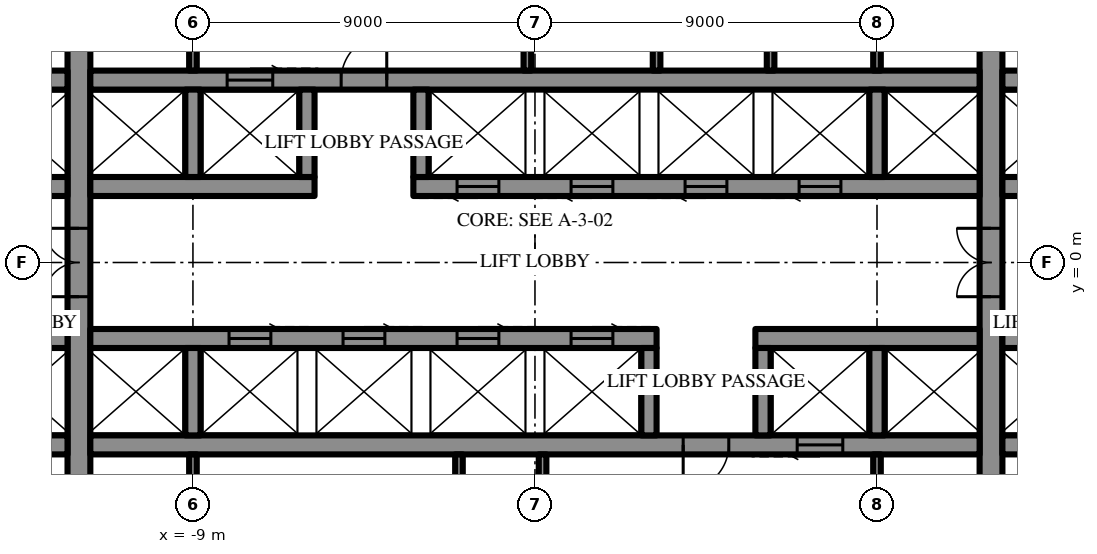
"""IFC4 building model, lengths in metres.
Left out: names, types, materials, properties, quantities, classifications, styles, units other than length and angle.
Written with IfcOpenShell. Run it as: python <this file> out.ifc"""

import sys

from ifc_helpers import new_model, si_unit, direction, frame, frame_2d, origin, place, context, subcontext, project, spatial, rectangle, extrude, element, fill, save


model = new_model("IFC4")
c1 = context("Model", 3, precision=1e-05, world=origin(), true_north=direction((0.0, 1.0)))
c2 = subcontext(c1, "Body", "Model", "MODEL_VIEW")
j1 = project(units=[si_unit("LENGTHUNIT", "METRE"), si_unit("PLANEANGLEUNIT", "RADIAN")], contexts=[c1])
p1 = place(None, origin())
s1 = spatial("IfcSite", under=j1, at=p1, CompositionType="ELEMENT")
p2 = place(p1, origin())
s2 = spatial("IfcBuilding", under=s1, at=p2, CompositionType="ELEMENT")
p3 = place(p2, frame((0.0, 0.0, 157.3)))
s3 = spatial("IfcBuildingStorey", under=s2, at=p3, CompositionType="ELEMENT", Elevation=157.3)
p4 = place(p3, frame((12.0, -10.7, 0.0), z_axis=(0.0, 0.0, 1.0), x_axis=(0.0, 1.0, 0.0)))
e1 = element("IfcWall", 1, at=p4, inside=s3, PredefinedType="SHEAR", context=c2, shape_type="SweptSolid", body=[
    extrude(rectangle(XDim=21.4, YDim=0.6, at=frame_2d((10.7, 0.0))), origin(), (0.0, 0.0, 1.0), 4.2),
])
p5 = place(p4, frame((9.8, 0.0, 0.0)))
e2 = element("IfcOpeningElement", 2, at=p5, cuts=e1, PredefinedType="OPENING", context=c2, shape_type="SweptSolid", body=[
    extrude(rectangle(XDim=1.8, YDim=2.4, at=frame_2d((0.9, 1.2))), frame((0.0, 0.31, 0.0), z_axis=(0.0, -1.0, 0.0), x_axis=(1.0, 0.0, 0.0)), (0.0, 0.0, 1.0), 0.62),
])
p6 = place(p3, frame((-12.0, -10.7, 0.0), z_axis=(0.0, 0.0, 1.0), x_axis=(0.0, 1.0, 0.0)))
e3 = element("IfcWall", 3, at=p6, inside=s3, PredefinedType="SHEAR", context=c2, shape_type="SweptSolid", body=[
    extrude(rectangle(XDim=21.4, YDim=0.6, at=frame_2d((10.7, 0.0))), origin(), (0.0, 0.0, 1.0), 4.2),
])
p7 = place(p6, frame((9.8, 0.0, 0.0)))
e4 = element("IfcOpeningElement", 4, at=p7, cuts=e3, PredefinedType="OPENING", context=c2, shape_type="SweptSolid", body=[
    extrude(rectangle(XDim=1.8, YDim=2.4, at=frame_2d((0.9, 1.2))), frame((0.0, 0.31, 0.0), z_axis=(0.0, -1.0, 0.0), x_axis=(1.0, 0.0, 0.0)), (0.0, 0.0, 1.0), 0.62),
])
p8 = place(p3, frame((-14.7, 2.0, 0.0), z_axis=(0.0, 0.0, 1.0), x_axis=(1.0, 0.0, 0.0)))
e5 = element("IfcWall", 5, at=p8, inside=s3, PredefinedType="SHEAR", context=c2, shape_type="SweptSolid", body=[
    extrude(rectangle(XDim=2.4, YDim=0.5, at=frame_2d((1.2, 0.0))), origin(), (0.0, 0.0, 1.0), 4.2),
])
p9 = place(p3, frame((-11.7, 2.0, 0.0), z_axis=(0.0, 0.0, 1.0), x_axis=(1.0, 0.0, 0.0)))
e6 = element("IfcWall", 6, at=p9, inside=s3, PredefinedType="SHEAR", context=c2, shape_type="SweptSolid", body=[
    extrude(rectangle(XDim=5.9, YDim=0.5, at=frame_2d((2.95, 0.0))), origin(), (0.0, 0.0, 1.0), 4.2),
])
p10 = place(p3, frame((-3.2, 2.0, 0.0), z_axis=(0.0, 0.0, 1.0), x_axis=(1.0, 0.0, 0.0)))
e7 = element("IfcWall", 7, at=p10, inside=s3, PredefinedType="SHEAR", context=c2, shape_type="SweptSolid", body=[
    extrude(rectangle(XDim=14.9, YDim=0.5, at=frame_2d((7.45, 0.0))), origin(), (0.0, 0.0, 1.0), 4.2),
])
p11 = place(p10, frame((1.15, 0.0, 0.0)))
e8 = element("IfcOpeningElement", 8, at=p11, cuts=e7, PredefinedType="OPENING", context=c2, shape_type="SweptSolid", body=[
    extrude(rectangle(XDim=1.1, YDim=2.2, at=frame_2d((0.55, 1.1))), frame((0.0, 0.26, 0.0), z_axis=(0.0, -1.0, 0.0), x_axis=(1.0, 0.0, 0.0)), (0.0, 0.0, 1.0), 0.52),
])
p12 = place(p10, frame((4.15, 0.0, 0.0)))
e9 = element("IfcOpeningElement", 9, at=p12, cuts=e7, PredefinedType="OPENING", context=c2, shape_type="SweptSolid", body=[
    extrude(rectangle(XDim=1.1, YDim=2.2, at=frame_2d((0.55, 1.1))), frame((0.0, 0.26, 0.0), z_axis=(0.0, -1.0, 0.0), x_axis=(1.0, 0.0, 0.0)), (0.0, 0.0, 1.0), 0.52),
])
p13 = place(p10, frame((7.15, 0.0, 0.0)))
e10 = element("IfcOpeningElement", 10, at=p13, cuts=e7, PredefinedType="OPENING", context=c2, shape_type="SweptSolid", body=[
    extrude(rectangle(XDim=1.1, YDim=2.2, at=frame_2d((0.55, 1.1))), frame((0.0, 0.26, 0.0), z_axis=(0.0, -1.0, 0.0), x_axis=(1.0, 0.0, 0.0)), (0.0, 0.0, 1.0), 0.52),
])
p14 = place(p10, frame((10.15, 0.0, 0.0)))
e11 = element("IfcOpeningElement", 11, at=p14, cuts=e7, PredefinedType="OPENING", context=c2, shape_type="SweptSolid", body=[
    extrude(rectangle(XDim=1.1, YDim=2.2, at=frame_2d((0.55, 1.1))), frame((0.0, 0.26, 0.0), z_axis=(0.0, -1.0, 0.0), x_axis=(1.0, 0.0, 0.0)), (0.0, 0.0, 1.0), 0.52),
])
for number, where, z_axis, x_axis in (
    (12, (12.3, 2.0, 0.0), (0.0, 0.0, 1.0), (1.0, 0.0, 0.0)),
    (13, (-14.7, 4.8, 0.0), (0.0, 0.0, 1.0), (1.0, 0.0, 0.0)),
):
    element("IfcWall", number, at=place(p3, frame(where, z_axis=z_axis, x_axis=x_axis)), inside=s3, PredefinedType="SHEAR", context=c2, shape_type="SweptSolid", body=[
        extrude(rectangle(XDim=2.4, YDim=0.5, at=frame_2d((1.2, 0.0))), origin(), (0.0, 0.0, 1.0), 4.2),
    ])
p15 = place(p3, frame((-11.7, 4.8, 0.0), z_axis=(0.0, 0.0, 1.0), x_axis=(1.0, 0.0, 0.0)))
e14 = element("IfcWall", 14, at=p15, inside=s3, PredefinedType="SHEAR", context=c2, shape_type="SweptSolid", body=[
    extrude(rectangle(XDim=23.4, YDim=0.5, at=frame_2d((11.7, 0.0))), origin(), (0.0, 0.0, 1.0), 4.2),
])
p16 = place(p15, frame((6.6, 0.0, 0.0)))
e15 = element("IfcOpeningElement", 15, at=p16, cuts=e14, PredefinedType="OPENING", context=c2, shape_type="SweptSolid", body=[
    extrude(rectangle(XDim=1.2, YDim=2.2, at=frame_2d((0.6, 1.1))), frame((0.0, 0.26, 0.0), z_axis=(0.0, -1.0, 0.0), x_axis=(1.0, 0.0, 0.0)), (0.0, 0.0, 1.0), 0.52),
])
p17 = place(p15, frame((3.6, 0.0, 0.0)))
e16 = element("IfcOpeningElement", 16, at=p17, cuts=e14, PredefinedType="OPENING", context=c2, shape_type="SweptSolid", body=[
    extrude(rectangle(XDim=1.2, YDim=2.2, at=frame_2d((0.6, 1.1))), frame((0.0, 0.26, 0.0), z_axis=(0.0, -1.0, 0.0), x_axis=(1.0, 0.0, 0.0)), (0.0, 0.0, 1.0), 0.52),
])
p18 = place(p3, frame((12.3, 4.8, 0.0), z_axis=(0.0, 0.0, 1.0), x_axis=(1.0, 0.0, 0.0)))
e17 = element("IfcWall", 17, at=p18, inside=s3, PredefinedType="SHEAR", context=c2, shape_type="SweptSolid", body=[
    extrude(rectangle(XDim=2.4, YDim=0.5, at=frame_2d((1.2, 0.0))), origin(), (0.0, 0.0, 1.0), 4.2),
])
for number, where, z_axis, x_axis in (
    (18, (-9.0, 2.25, 0.0), (0.0, 0.0, 1.0), (0.0, 1.0, 0.0)),
    (19, (-6.0, 2.25, 0.0), (0.0, 0.0, 1.0), (0.0, 1.0, 0.0)),
    (20, (-3.0, 2.25, 0.0), (0.0, 0.0, 1.0), (0.0, 1.0, 0.0)),
    (21, (9.0, 2.25, 0.0), (0.0, 0.0, 1.0), (0.0, 1.0, 0.0)),
):
    element("IfcWall", number, at=place(p3, frame(where, z_axis=z_axis, x_axis=x_axis)), inside=s3, PredefinedType="SHEAR", context=c2, shape_type="SweptSolid", body=[
        extrude(rectangle(XDim=2.3, YDim=0.4, at=frame_2d((1.15, 0.0))), origin(), (0.0, 0.0, 1.0), 4.2),
    ])
p19 = place(p3, frame((-0.2, 5.05, 0.0), z_axis=(0.0, 0.0, 1.0), x_axis=(0.0, 1.0, 0.0)))
e22 = element("IfcWall", 22, at=p19, inside=s3, PredefinedType="SHEAR", context=c2, shape_type="SweptSolid", body=[
    extrude(rectangle(XDim=5.65, YDim=0.2, at=frame_2d((2.825, 0.0))), origin(), (0.0, 0.0, 1.0), 4.2),
])
p20 = place(p3, frame((14.7, -2.0, 0.0), z_axis=(0.0, 0.0, 1.0), x_axis=(-1.0, 0.0, 0.0)))
e23 = element("IfcWall", 23, at=p20, inside=s3, PredefinedType="SHEAR", context=c2, shape_type="SweptSolid", body=[
    extrude(rectangle(XDim=2.4, YDim=0.5, at=frame_2d((1.2, 0.0))), origin(), (0.0, 0.0, 1.0), 4.2),
])
p21 = place(p3, frame((11.7, -2.0, 0.0), z_axis=(0.0, 0.0, 1.0), x_axis=(-1.0, 0.0, 0.0)))
e24 = element("IfcWall", 24, at=p21, inside=s3, PredefinedType="SHEAR", context=c2, shape_type="SweptSolid", body=[
    extrude(rectangle(XDim=5.9, YDim=0.5, at=frame_2d((2.95, 0.0))), origin(), (0.0, 0.0, 1.0), 4.2),
])
p22 = place(p3, frame((3.2, -2.0, 0.0), z_axis=(0.0, 0.0, 1.0), x_axis=(-1.0, 0.0, 0.0)))
e25 = element("IfcWall", 25, at=p22, inside=s3, PredefinedType="SHEAR", context=c2, shape_type="SweptSolid", body=[
    extrude(rectangle(XDim=14.9, YDim=0.5, at=frame_2d((7.45, 0.0))), origin(), (0.0, 0.0, 1.0), 4.2),
])
p23 = place(p22, frame((1.15, 0.0, 0.0)))
e26 = element("IfcOpeningElement", 26, at=p23, cuts=e25, PredefinedType="OPENING", context=c2, shape_type="SweptSolid", body=[
    extrude(rectangle(XDim=1.1, YDim=2.2, at=frame_2d((0.55, 1.1))), frame((0.0, 0.26, 0.0), z_axis=(0.0, -1.0, 0.0), x_axis=(1.0, 0.0, 0.0)), (0.0, 0.0, 1.0), 0.52),
])
p24 = place(p22, frame((4.15, 0.0, 0.0)))
e27 = element("IfcOpeningElement", 27, at=p24, cuts=e25, PredefinedType="OPENING", context=c2, shape_type="SweptSolid", body=[
    extrude(rectangle(XDim=1.1, YDim=2.2, at=frame_2d((0.55, 1.1))), frame((0.0, 0.26, 0.0), z_axis=(0.0, -1.0, 0.0), x_axis=(1.0, 0.0, 0.0)), (0.0, 0.0, 1.0), 0.52),
])
p25 = place(p22, frame((7.15, 0.0, 0.0)))
e28 = element("IfcOpeningElement", 28, at=p25, cuts=e25, PredefinedType="OPENING", context=c2, shape_type="SweptSolid", body=[
    extrude(rectangle(XDim=1.1, YDim=2.2, at=frame_2d((0.55, 1.1))), frame((0.0, 0.26, 0.0), z_axis=(0.0, -1.0, 0.0), x_axis=(1.0, 0.0, 0.0)), (0.0, 0.0, 1.0), 0.52),
])
p26 = place(p22, frame((10.15, 0.0, 0.0)))
e29 = element("IfcOpeningElement", 29, at=p26, cuts=e25, PredefinedType="OPENING", context=c2, shape_type="SweptSolid", body=[
    extrude(rectangle(XDim=1.1, YDim=2.2, at=frame_2d((0.55, 1.1))), frame((0.0, 0.26, 0.0), z_axis=(0.0, -1.0, 0.0), x_axis=(1.0, 0.0, 0.0)), (0.0, 0.0, 1.0), 0.52),
])
for number, where, z_axis, x_axis in (
    (30, (-12.3, -2.0, 0.0), (0.0, 0.0, 1.0), (-1.0, 0.0, 0.0)),
    (31, (14.7, -4.8, 0.0), (0.0, 0.0, 1.0), (-1.0, 0.0, 0.0)),
):
    element("IfcWall", number, at=place(p3, frame(where, z_axis=z_axis, x_axis=x_axis)), inside=s3, PredefinedType="SHEAR", context=c2, shape_type="SweptSolid", body=[
        extrude(rectangle(XDim=2.4, YDim=0.5, at=frame_2d((1.2, 0.0))), origin(), (0.0, 0.0, 1.0), 4.2),
    ])
p27 = place(p3, frame((11.7, -4.8, 0.0), z_axis=(0.0, 0.0, 1.0), x_axis=(-1.0, 0.0, 0.0)))
e32 = element("IfcWall", 32, at=p27, inside=s3, PredefinedType="SHEAR", context=c2, shape_type="SweptSolid", body=[
    extrude(rectangle(XDim=23.4, YDim=0.5, at=frame_2d((11.7, 0.0))), origin(), (0.0, 0.0, 1.0), 4.2),
])
p28 = place(p27, frame((6.6, 0.0, 0.0)))
e33 = element("IfcOpeningElement", 33, at=p28, cuts=e32, PredefinedType="OPENING", context=c2, shape_type="SweptSolid", body=[
    extrude(rectangle(XDim=1.2, YDim=2.2, at=frame_2d((0.6, 1.1))), frame((0.0, 0.26, 0.0), z_axis=(0.0, -1.0, 0.0), x_axis=(1.0, 0.0, 0.0)), (0.0, 0.0, 1.0), 0.52),
])
p29 = place(p27, frame((3.6, 0.0, 0.0)))
e34 = element("IfcOpeningElement", 34, at=p29, cuts=e32, PredefinedType="OPENING", context=c2, shape_type="SweptSolid", body=[
    extrude(rectangle(XDim=1.2, YDim=2.2, at=frame_2d((0.6, 1.1))), frame((0.0, 0.26, 0.0), z_axis=(0.0, -1.0, 0.0), x_axis=(1.0, 0.0, 0.0)), (0.0, 0.0, 1.0), 0.52),
])
p30 = place(p3, frame((-12.3, -4.8, 0.0), z_axis=(0.0, 0.0, 1.0), x_axis=(-1.0, 0.0, 0.0)))
e35 = element("IfcWall", 35, at=p30, inside=s3, PredefinedType="SHEAR", context=c2, shape_type="SweptSolid", body=[
    extrude(rectangle(XDim=2.4, YDim=0.5, at=frame_2d((1.2, 0.0))), origin(), (0.0, 0.0, 1.0), 4.2),
])
for number, where, z_axis, x_axis in (
    (36, (9.0, -2.25, 0.0), (0.0, 0.0, 1.0), (0.0, -1.0, 0.0)),
    (37, (6.0, -2.25, 0.0), (0.0, 0.0, 1.0), (0.0, -1.0, 0.0)),
    (38, (3.0, -2.25, 0.0), (0.0, 0.0, 1.0), (0.0, -1.0, 0.0)),
    (39, (-9.0, -2.25, 0.0), (0.0, 0.0, 1.0), (0.0, -1.0, 0.0)),
):
    element("IfcWall", number, at=place(p3, frame(where, z_axis=z_axis, x_axis=x_axis)), inside=s3, PredefinedType="SHEAR", context=c2, shape_type="SweptSolid", body=[
        extrude(rectangle(XDim=2.3, YDim=0.4, at=frame_2d((1.15, 0.0))), origin(), (0.0, 0.0, 1.0), 4.2),
    ])
p31 = place(p3, frame((0.2, -5.05, 0.0), z_axis=(0.0, 0.0, 1.0), x_axis=(0.0, -1.0, 0.0)))
e40 = element("IfcWall", 40, at=p31, inside=s3, PredefinedType="SHEAR", context=c2, shape_type="SweptSolid", body=[
    extrude(rectangle(XDim=5.65, YDim=0.2, at=frame_2d((2.825, 0.0))), origin(), (0.0, 0.0, 1.0), 4.2),
])
for number, where, z_axis, x_axis in (
    (41, (-9.0, 5.05, 0.0), (0.0, 0.0, 1.0), (0.0, 1.0, 0.0)),
    (42, (9.0, 5.05, 0.0), (0.0, 0.0, 1.0), (0.0, 1.0, 0.0)),
    (43, (3.2, 5.05, 0.0), (0.0, 0.0, 1.0), (0.0, 1.0, 0.0)),
    (44, (6.2, 5.05, 0.0), (0.0, 0.0, 1.0), (0.0, 1.0, 0.0)),
    (45, (9.0, -5.05, 0.0), (0.0, 0.0, 1.0), (0.0, -1.0, 0.0)),
    (46, (-9.0, -5.05, 0.0), (0.0, 0.0, 1.0), (0.0, -1.0, 0.0)),
    (47, (-2.0, -5.05, 0.0), (0.0, 0.0, 1.0), (0.0, -1.0, 0.0)),
):
    element("IfcWall", number, at=place(p3, frame(where, z_axis=z_axis, x_axis=x_axis)), inside=s3, PredefinedType="PARTITIONING", context=c2, shape_type="SweptSolid", body=[
        extrude(rectangle(XDim=5.65, YDim=0.2, at=frame_2d((2.825, 0.0))), origin(), (0.0, 0.0, 1.0), 4.0),
    ])
p32 = place(p16, origin())
e48 = element("IfcDoor", 48, at=p32, inside=s3, OperationType="SINGLE_SWING_LEFT", PredefinedType="DOOR", context=c2, shape_type="SweptSolid", body=[
    extrude(rectangle(XDim=1.2, YDim=2.2, at=frame_2d((0.6, 1.1))), frame((0.0, 0.025, 0.0), z_axis=(0.0, -1.0, 0.0), x_axis=(1.0, 0.0, 0.0)), (0.0, 0.0, 1.0), 0.05),
])
fill(e15, e48)
p33 = place(p28, origin())
e49 = element("IfcDoor", 49, at=p33, inside=s3, OperationType="SINGLE_SWING_LEFT", PredefinedType="DOOR", context=c2, shape_type="SweptSolid", body=[
    extrude(rectangle(XDim=1.2, YDim=2.2, at=frame_2d((0.6, 1.1))), frame((0.0, 0.025, 0.0), z_axis=(0.0, -1.0, 0.0), x_axis=(1.0, 0.0, 0.0)), (0.0, 0.0, 1.0), 0.05),
])
fill(e33, e49)
p34 = place(p5, origin())
e50 = element("IfcDoor", 50, at=p34, inside=s3, OperationType="DOUBLE_DOOR_SINGLE_SWING", PredefinedType="DOOR", context=c2, shape_type="SweptSolid", body=[
    extrude(rectangle(XDim=1.8, YDim=2.4, at=frame_2d((0.9, 1.2))), frame((0.0, 0.025, 0.0), z_axis=(0.0, -1.0, 0.0), x_axis=(1.0, 0.0, 0.0)), (0.0, 0.0, 1.0), 0.05),
])
fill(e2, e50)
p35 = place(p7, origin())
e51 = element("IfcDoor", 51, at=p35, inside=s3, OperationType="DOUBLE_DOOR_SINGLE_SWING", PredefinedType="DOOR", context=c2, shape_type="SweptSolid", body=[
    extrude(rectangle(XDim=1.8, YDim=2.4, at=frame_2d((0.9, 1.2))), frame((0.0, 0.025, 0.0), z_axis=(0.0, -1.0, 0.0), x_axis=(1.0, 0.0, 0.0)), (0.0, 0.0, 1.0), 0.05),
])
fill(e4, e51)
p36 = place(p17, origin())
e52 = element("IfcDoor", 52, at=p36, inside=s3, OperationType="SLIDING_TO_LEFT", PredefinedType="DOOR", context=c2, shape_type="SweptSolid", body=[
    extrude(rectangle(XDim=1.2, YDim=2.2, at=frame_2d((0.6, 1.1))), frame((0.0, 0.025, 0.0), z_axis=(0.0, -1.0, 0.0), x_axis=(1.0, 0.0, 0.0)), (0.0, 0.0, 1.0), 0.05),
])
fill(e16, e52)
p37 = place(p11, frame((1.1, 0.0, 0.0), z_axis=(0.0, 0.0, 1.0), x_axis=(-1.0, 0.0, 0.0)))
e53 = element("IfcDoor", 53, at=p37, inside=s3, OperationType="SLIDING_TO_LEFT", PredefinedType="DOOR", context=c2, shape_type="SweptSolid", body=[
    extrude(rectangle(XDim=1.1, YDim=2.2, at=frame_2d((0.55, 1.1))), frame((0.0, 0.025, 0.0), z_axis=(0.0, -1.0, 0.0), x_axis=(1.0, 0.0, 0.0)), (0.0, 0.0, 1.0), 0.05),
])
fill(e8, e53)
p38 = place(p12, frame((1.1, 0.0, 0.0), z_axis=(0.0, 0.0, 1.0), x_axis=(-1.0, 0.0, 0.0)))
e54 = element("IfcDoor", 54, at=p38, inside=s3, OperationType="SLIDING_TO_LEFT", PredefinedType="DOOR", context=c2, shape_type="SweptSolid", body=[
    extrude(rectangle(XDim=1.1, YDim=2.2, at=frame_2d((0.55, 1.1))), frame((0.0, 0.025, 0.0), z_axis=(0.0, -1.0, 0.0), x_axis=(1.0, 0.0, 0.0)), (0.0, 0.0, 1.0), 0.05),
])
fill(e9, e54)
p39 = place(p13, frame((1.1, 0.0, 0.0), z_axis=(0.0, 0.0, 1.0), x_axis=(-1.0, 0.0, 0.0)))
e55 = element("IfcDoor", 55, at=p39, inside=s3, OperationType="SLIDING_TO_LEFT", PredefinedType="DOOR", context=c2, shape_type="SweptSolid", body=[
    extrude(rectangle(XDim=1.1, YDim=2.2, at=frame_2d((0.55, 1.1))), frame((0.0, 0.025, 0.0), z_axis=(0.0, -1.0, 0.0), x_axis=(1.0, 0.0, 0.0)), (0.0, 0.0, 1.0), 0.05),
])
fill(e10, e55)
p40 = place(p14, frame((1.1, 0.0, 0.0), z_axis=(0.0, 0.0, 1.0), x_axis=(-1.0, 0.0, 0.0)))
e56 = element("IfcDoor", 56, at=p40, inside=s3, OperationType="SLIDING_TO_LEFT", PredefinedType="DOOR", context=c2, shape_type="SweptSolid", body=[
    extrude(rectangle(XDim=1.1, YDim=2.2, at=frame_2d((0.55, 1.1))), frame((0.0, 0.025, 0.0), z_axis=(0.0, -1.0, 0.0), x_axis=(1.0, 0.0, 0.0)), (0.0, 0.0, 1.0), 0.05),
])
fill(e11, e56)
p41 = place(p29, origin())
e57 = element("IfcDoor", 57, at=p41, inside=s3, OperationType="SLIDING_TO_LEFT", PredefinedType="DOOR", context=c2, shape_type="SweptSolid", body=[
    extrude(rectangle(XDim=1.2, YDim=2.2, at=frame_2d((0.6, 1.1))), frame((0.0, 0.025, 0.0), z_axis=(0.0, -1.0, 0.0), x_axis=(1.0, 0.0, 0.0)), (0.0, 0.0, 1.0), 0.05),
])
fill(e34, e57)
p42 = place(p23, frame((1.1, 0.0, 0.0), z_axis=(0.0, 0.0, 1.0), x_axis=(-1.0, 0.0, 0.0)))
e58 = element("IfcDoor", 58, at=p42, inside=s3, OperationType="SLIDING_TO_LEFT", PredefinedType="DOOR", context=c2, shape_type="SweptSolid", body=[
    extrude(rectangle(XDim=1.1, YDim=2.2, at=frame_2d((0.55, 1.1))), frame((0.0, 0.025, 0.0), z_axis=(0.0, -1.0, 0.0), x_axis=(1.0, 0.0, 0.0)), (0.0, 0.0, 1.0), 0.05),
])
fill(e26, e58)
p43 = place(p24, frame((1.1, 0.0, 0.0), z_axis=(0.0, 0.0, 1.0), x_axis=(-1.0, 0.0, 0.0)))
e59 = element("IfcDoor", 59, at=p43, inside=s3, OperationType="SLIDING_TO_LEFT", PredefinedType="DOOR", context=c2, shape_type="SweptSolid", body=[
    extrude(rectangle(XDim=1.1, YDim=2.2, at=frame_2d((0.55, 1.1))), frame((0.0, 0.025, 0.0), z_axis=(0.0, -1.0, 0.0), x_axis=(1.0, 0.0, 0.0)), (0.0, 0.0, 1.0), 0.05),
])
fill(e27, e59)
p44 = place(p25, frame((1.1, 0.0, 0.0), z_axis=(0.0, 0.0, 1.0), x_axis=(-1.0, 0.0, 0.0)))
e60 = element("IfcDoor", 60, at=p44, inside=s3, OperationType="SLIDING_TO_LEFT", PredefinedType="DOOR", context=c2, shape_type="SweptSolid", body=[
    extrude(rectangle(XDim=1.1, YDim=2.2, at=frame_2d((0.55, 1.1))), frame((0.0, 0.025, 0.0), z_axis=(0.0, -1.0, 0.0), x_axis=(1.0, 0.0, 0.0)), (0.0, 0.0, 1.0), 0.05),
])
fill(e28, e60)
p45 = place(p26, frame((1.1, 0.0, 0.0), z_axis=(0.0, 0.0, 1.0), x_axis=(-1.0, 0.0, 0.0)))
e61 = element("IfcDoor", 61, at=p45, inside=s3, OperationType="SLIDING_TO_LEFT", PredefinedType="DOOR", context=c2, shape_type="SweptSolid", body=[
    extrude(rectangle(XDim=1.1, YDim=2.2, at=frame_2d((0.55, 1.1))), frame((0.0, 0.025, 0.0), z_axis=(0.0, -1.0, 0.0), x_axis=(1.0, 0.0, 0.0)), (0.0, 0.0, 1.0), 0.05),
])
fill(e29, e61)
save(model, sys.argv[1])
